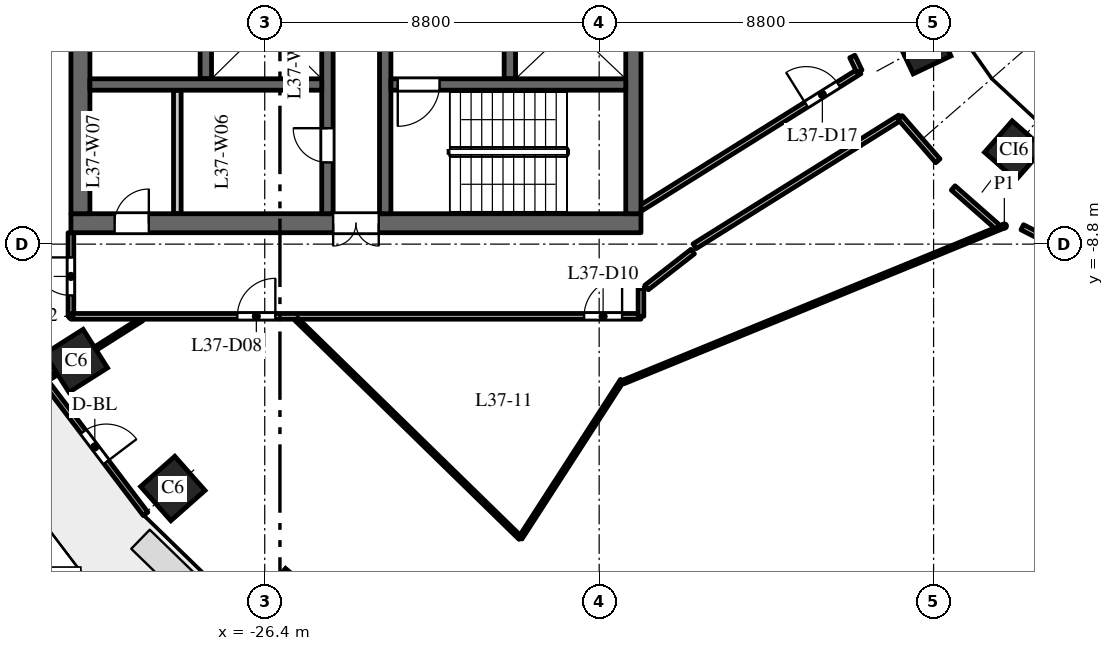
"""IFC4 building model, lengths in metres.
Left out: names, types, materials, properties, quantities, classifications, styles, units other than length and angle.
Written with IfcOpenShell. Run it as: python <this file> out.ifc"""

import sys

from ifc_helpers import new_model, si_unit, direction, frame, frame_2d, origin, origin_2d, place, context, subcontext, project, spatial, rectangle, extrude, element, fill, save


model = new_model("IFC4")
c1 = context("Model", 3, precision=1e-05, world=origin(), true_north=direction((0.0, 1.0)))
c2 = subcontext(c1, "Body", "Model", "MODEL_VIEW")
j1 = project(units=[si_unit("LENGTHUNIT", "METRE"), si_unit("PLANEANGLEUNIT", "RADIAN")], contexts=[c1])
p1 = place(None, origin())
s1 = spatial("IfcSite", under=j1, at=p1, CompositionType="ELEMENT")
p2 = place(p1, origin())
s2 = spatial("IfcBuilding", under=s1, at=p2, CompositionType="ELEMENT")
p3 = place(p2, frame((0.0, 0.0, 162.0)))
s3 = spatial("IfcBuildingStorey", under=s2, at=p3, CompositionType="ELEMENT", Elevation=162.0)
for number, where, z_axis, x_axis in (
    (1, (-31.365, -11.871, 0.0), (0.0, 0.0, 1.0), (0.535, -0.845, 0.0)),
    (2, (-28.819, -15.23, 0.0), (0.0, 0.0, 1.0), (0.663, -0.749, 0.0)),
    (3, (-25.783, -18.18, 0.0), (0.0, 0.0, 1.0), (0.763, -0.646, 0.0)),
):
    element("IfcColumn", number, at=place(p3, frame(where, z_axis=z_axis, x_axis=x_axis)), inside=s3, PredefinedType="COLUMN", context=c2, shape_type="SweptSolid", body=[
        extrude(rectangle(XDim=1.2, YDim=1.2, at=origin_2d()), origin(), (0.0, 0.0, 1.0), 4.0),
    ])
for number, where, z_axis, x_axis in (
    (4, (-9.076, -3.588, 0.0), (0.0, 0.0, 1.0), (0.429, -0.903, 0.0)),
    (5, (-6.682, -6.334, 0.0), (0.0, 0.0, 1.0), (0.751, -0.66, 0.0)),
):
    element("IfcColumn", number, at=place(p3, frame(where, z_axis=z_axis, x_axis=x_axis)), inside=s3, PredefinedType="COLUMN", context=c2, shape_type="SweptSolid", body=[
        extrude(rectangle(XDim=1.1, YDim=1.1, at=origin_2d()), origin(), (0.0, 0.0, 1.0), 4.0),
    ])
p4 = place(p3, frame((-16.5, -8.25, 0.0), z_axis=(0.0, 0.0, 1.0), x_axis=(-1.0, 0.0, 0.0)))
e6 = element("IfcWall", 6, at=p4, inside=s3, PredefinedType="SHEAR", context=c2, shape_type="SweptSolid", body=[
    extrude(rectangle(XDim=15.0, YDim=0.5, at=frame_2d((7.5, 0.0))), origin(), (0.0, 0.0, 1.0), 3.7),
])
p5 = place(p4, frame((6.9, 0.0, 0.0)))
e7 = element("IfcOpeningElement", 7, at=p5, cuts=e6, PredefinedType="OPENING", context=c2, shape_type="SweptSolid", body=[
    extrude(rectangle(XDim=1.2, YDim=2.1, at=frame_2d((0.6, 1.05))), frame((0.0, 0.26, 0.0), z_axis=(0.0, -1.0, 0.0), x_axis=(1.0, 0.0, 0.0)), (0.0, 0.0, 1.0), 0.52),
])
p6 = place(p4, frame((12.95, 0.0, 0.0)))
e8 = element("IfcOpeningElement", 8, at=p6, cuts=e6, PredefinedType="OPENING", context=c2, shape_type="SweptSolid", body=[
    extrude(rectangle(XDim=0.9, YDim=2.1, at=frame_2d((0.45, 1.05))), frame((0.0, 0.26, 0.0), z_axis=(0.0, -1.0, 0.0), x_axis=(1.0, 0.0, 0.0)), (0.0, 0.0, 1.0), 0.52),
])
p7 = place(p3, frame((-27.95, -4.45, 0.0), z_axis=(0.0, 0.0, 1.0), x_axis=(0.0, 1.0, 0.0)))
e9 = element("IfcWall", 9, at=p7, inside=s3, PredefinedType="SHEAR", context=c2, shape_type="SweptSolid", body=[
    extrude(rectangle(XDim=8.9, YDim=0.3, at=frame_2d((4.45, 0.0))), origin(), (0.0, 0.0, 1.0), 3.7),
])
p8 = place(p3, frame((-19.95, -4.45, 0.0), z_axis=(0.0, 0.0, 1.0), x_axis=(0.0, 1.0, 0.0)))
e10 = element("IfcWall", 10, at=p8, inside=s3, PredefinedType="SHEAR", context=c2, shape_type="SweptSolid", body=[
    extrude(rectangle(XDim=8.9, YDim=0.3, at=frame_2d((4.45, 0.0))), origin(), (0.0, 0.0, 1.0), 3.7),
])
p9 = place(p8, frame((0.775, 0.0, 0.0)))
e11 = element("IfcOpeningElement", 11, at=p9, cuts=e10, PredefinedType="OPENING", context=c2, shape_type="SweptSolid", body=[
    extrude(rectangle(XDim=1.2, YDim=2.1, at=frame_2d((0.6, 1.05))), frame((0.0, 0.16, 0.0), z_axis=(0.0, -1.0, 0.0), x_axis=(1.0, 0.0, 0.0)), (0.0, 0.0, 1.0), 0.32),
])
p10 = place(p8, frame((7.25, 0.0, 0.0)))
e12 = element("IfcOpeningElement", 12, at=p10, cuts=e10, PredefinedType="OPENING", context=c2, shape_type="SweptSolid", body=[
    extrude(rectangle(XDim=1.1, YDim=2.1, at=frame_2d((0.55, 1.05))), frame((0.0, 0.16, 0.0), z_axis=(0.0, -1.0, 0.0), x_axis=(1.0, 0.0, 0.0)), (0.0, 0.0, 1.0), 0.32),
])
p11 = place(p3, frame((-24.75, -8.0, 0.0), z_axis=(0.0, 0.0, 1.0), x_axis=(0.0, 1.0, 0.0)))
e13 = element("IfcWall", 13, at=p11, inside=s3, PredefinedType="SHEAR", context=c2, shape_type="SweptSolid", body=[
    extrude(rectangle(XDim=16.0, YDim=0.3, at=frame_2d((8.0, 0.0))), origin(), (0.0, 0.0, 1.0), 3.7),
])
p12 = place(p11, frame((4.425, 0.0, 0.0)))
e14 = element("IfcOpeningElement", 14, at=p12, cuts=e13, PredefinedType="OPENING", context=c2, shape_type="SweptSolid", body=[
    extrude(rectangle(XDim=1.1, YDim=2.1, at=frame_2d((0.55, 1.05))), frame((0.0, 0.16, 0.0), z_axis=(0.0, -1.0, 0.0), x_axis=(1.0, 0.0, 0.0)), (0.0, 0.0, 1.0), 0.32),
])
p13 = place(p11, frame((7.45, 0.0, 0.0)))
e15 = element("IfcOpeningElement", 15, at=p13, cuts=e13, PredefinedType="OPENING", context=c2, shape_type="SweptSolid", body=[
    extrude(rectangle(XDim=1.1, YDim=2.1, at=frame_2d((0.55, 1.05))), frame((0.0, 0.16, 0.0), z_axis=(0.0, -1.0, 0.0), x_axis=(1.0, 0.0, 0.0)), (0.0, 0.0, 1.0), 0.32),
])
p14 = place(p11, frame((10.475, 0.0, 0.0)))
e16 = element("IfcOpeningElement", 16, at=p14, cuts=e13, PredefinedType="OPENING", context=c2, shape_type="SweptSolid", body=[
    extrude(rectangle(XDim=1.1, YDim=2.1, at=frame_2d((0.55, 1.05))), frame((0.0, 0.16, 0.0), z_axis=(0.0, -1.0, 0.0), x_axis=(1.0, 0.0, 0.0)), (0.0, 0.0, 1.0), 0.32),
])
p15 = place(p11, frame((13.75, 0.0, 0.0)))
e17 = element("IfcOpeningElement", 17, at=p15, cuts=e13, PredefinedType="OPENING", context=c2, shape_type="SweptSolid", body=[
    extrude(rectangle(XDim=0.9, YDim=2.1, at=frame_2d((0.45, 1.05))), frame((0.0, 0.16, 0.0), z_axis=(0.0, -1.0, 0.0), x_axis=(1.0, 0.0, 0.0)), (0.0, 0.0, 1.0), 0.32),
])
p16 = place(p11, frame((1.35, 0.0, 0.0)))
e18 = element("IfcOpeningElement", 18, at=p16, cuts=e13, PredefinedType="OPENING", context=c2, shape_type="SweptSolid", body=[
    extrude(rectangle(XDim=0.9, YDim=2.1, at=frame_2d((0.45, 1.05))), frame((0.0, 0.16, 0.0), z_axis=(0.0, -1.0, 0.0), x_axis=(1.0, 0.0, 0.0)), (0.0, 0.0, 1.0), 0.32),
])
p17 = place(p3, frame((-16.7, -8.0, 0.0), z_axis=(0.0, 0.0, 1.0), x_axis=(0.0, 1.0, 0.0)))
e19 = element("IfcWall", 19, at=p17, inside=s3, PredefinedType="SHEAR", context=c2, shape_type="SweptSolid", body=[
    extrude(rectangle(XDim=16.0, YDim=0.4, at=frame_2d((8.0, 0.0))), origin(), (0.0, 0.0, 1.0), 3.7),
])
p18 = place(p3, frame((-31.25, -8.0, 0.0), z_axis=(0.0, 0.0, 1.0), x_axis=(0.0, 1.0, 0.0)))
e20 = element("IfcWall", 20, at=p18, inside=s3, PredefinedType="SHEAR", context=c2, shape_type="SweptSolid", body=[
    extrude(rectangle(XDim=16.0, YDim=0.5, at=frame_2d((8.0, 0.0))), origin(), (0.0, 0.0, 1.0), 3.7),
])
p19 = place(p3, frame((-28.7, -8.0, 0.0), z_axis=(0.0, 0.0, 1.0), x_axis=(0.0, 1.0, 0.0)))
e21 = element("IfcWall", 21, at=p19, inside=s3, PredefinedType="PARTITIONING", context=c2, shape_type="SweptSolid", body=[
    extrude(rectangle(XDim=3.25, YDim=0.2, at=frame_2d((1.625, 0.0))), origin(), (0.0, 0.0, 1.0), 3.7),
])
p20 = place(p3, frame((-24.9, -4.6, 0.0), z_axis=(0.0, 0.0, 1.0), x_axis=(-1.0, 0.0, 0.0)))
e22 = element("IfcWall", 22, at=p20, inside=s3, PredefinedType="SHEAR", context=c2, shape_type="SweptSolid", body=[
    extrude(rectangle(XDim=6.1, YDim=0.3, at=frame_2d((3.05, 0.0))), origin(), (0.0, 0.0, 1.0), 3.7),
])
p21 = place(p3, frame((-23.23, -8.0, 0.0), z_axis=(0.0, 0.0, 1.0), x_axis=(0.0, 1.0, 0.0)))
e23 = element("IfcWall", 23, at=p21, inside=s3, PredefinedType="SHEAR", context=c2, shape_type="SweptSolid", body=[
    extrude(rectangle(XDim=7.875, YDim=0.3, at=frame_2d((3.938, 0.0))), origin(), (0.0, 0.0, 1.0), 3.7),
])
p22 = place(p21, frame((5.15, 0.0, 0.0)))
e24 = element("IfcOpeningElement", 24, at=p22, cuts=e23, PredefinedType="OPENING", context=c2, shape_type="SweptSolid", body=[
    extrude(rectangle(XDim=1.1, YDim=2.1, at=frame_2d((0.55, 1.05))), frame((0.0, 0.16, 0.0), z_axis=(0.0, -1.0, 0.0), x_axis=(1.0, 0.0, 0.0)), (0.0, 0.0, 1.0), 0.32),
])
p23 = place(p3, frame((-16.9, -4.6, 0.0), z_axis=(0.0, 0.0, 1.0), x_axis=(-1.0, 0.0, 0.0)))
e25 = element("IfcWall", 25, at=p23, inside=s3, PredefinedType="SHEAR", context=c2, shape_type="SweptSolid", body=[
    extrude(rectangle(XDim=6.18, YDim=0.3, at=frame_2d((3.09, 0.0))), origin(), (0.0, 0.0, 1.0), 3.7),
])
p24 = place(p23, frame((4.9, 0.0, 0.0)))
e26 = element("IfcOpeningElement", 26, at=p24, cuts=e25, PredefinedType="OPENING", context=c2, shape_type="SweptSolid", body=[
    extrude(rectangle(XDim=1.1, YDim=2.1, at=frame_2d((0.55, 1.05))), frame((0.0, 0.16, 0.0), z_axis=(0.0, -1.0, 0.0), x_axis=(1.0, 0.0, 0.0)), (0.0, 0.0, 1.0), 0.32),
])
p25 = place(p3, frame((-32.208, -12.374, 0.0), z_axis=(0.0, 0.0, 1.0), x_axis=(0.604045763106, -0.796949632081, 0.0)))
e27 = element("IfcWall", 27, at=p25, inside=s3, PredefinedType="STANDARD", context=c2, shape_type="SweptSolid", body=[
    extrude(rectangle(XDim=4.423, YDim=0.15, at=frame_2d((2.212, 0.0))), origin(), (0.0, 0.0, 1.0), 3.7),
])
p26 = place(p25, frame((1.712, 0.0, 0.0)))
e28 = element("IfcOpeningElement", 28, at=p26, cuts=e27, PredefinedType="OPENING", context=c2, shape_type="SweptSolid", body=[
    extrude(rectangle(XDim=1.0, YDim=2.4, at=frame_2d((0.5, 1.2))), frame((0.0, 0.085, 0.0), z_axis=(0.0, -1.0, 0.0), x_axis=(1.0, 0.0, 0.0)), (0.0, 0.0, 1.0), 0.17),
])
p27 = place(p3, frame((-32.212, -12.408, 0.0), z_axis=(0.0, 0.0, 1.0), x_axis=(0.844810627195, 0.535065420467, 0.0)))
e29 = element("IfcWall", 29, at=p27, inside=s3, PredefinedType="PARTITIONING", context=c2, shape_type="SweptSolid", body=[
    extrude(rectangle(XDim=3.048, YDim=0.1, at=frame_2d((1.524, 0.0))), origin(), (0.0, 0.0, 1.0), 3.7),
])
p28 = place(p3, frame((-31.5, -10.7, 0.0), z_axis=(0.0, 0.0, 1.0), x_axis=(0.0, 1.0, 0.0)))
e30 = element("IfcWall", 30, at=p28, inside=s3, PredefinedType="PARTITIONING", context=c2, shape_type="SweptSolid", body=[
    extrude(rectangle(XDim=2.2, YDim=0.15, at=frame_2d((1.1, 0.0))), origin(), (0.0, 0.0, 1.0), 3.7),
])
p29 = place(p28, frame((0.55, 0.0, 0.0)))
e31 = element("IfcOpeningElement", 31, at=p29, cuts=e30, PredefinedType="OPENING", context=c2, shape_type="SweptSolid", body=[
    extrude(rectangle(XDim=1.0, YDim=2.1, at=frame_2d((0.5, 1.05))), frame((0.0, 0.085, 0.0), z_axis=(0.0, -1.0, 0.0), x_axis=(1.0, 0.0, 0.0)), (0.0, 0.0, 1.0), 0.17),
])
p30 = place(p3, frame((-31.5, -10.7, 0.0), z_axis=(0.0, 0.0, 1.0), x_axis=(1.0, 0.0, 0.0)))
e32 = element("IfcWall", 32, at=p30, inside=s3, PredefinedType="PARTITIONING", context=c2, shape_type="SweptSolid", body=[
    extrude(rectangle(XDim=15.0, YDim=0.15, at=frame_2d((7.5, 0.0))), origin(), (0.0, 0.0, 1.0), 3.1),
])
p31 = place(p30, frame((4.379, 0.0, 0.0)))
e33 = element("IfcOpeningElement", 33, at=p31, cuts=e32, PredefinedType="OPENING", context=c2, shape_type="SweptSolid", body=[
    extrude(rectangle(XDim=1.0, YDim=2.1, at=frame_2d((0.5, 1.05))), frame((0.0, 0.085, 0.0), z_axis=(0.0, -1.0, 0.0), x_axis=(1.0, 0.0, 0.0)), (0.0, 0.0, 1.0), 0.17),
])
p32 = place(p30, frame((13.504, 0.0, 0.0)))
e34 = element("IfcOpeningElement", 34, at=p32, cuts=e32, PredefinedType="OPENING", context=c2, shape_type="SweptSolid", body=[
    extrude(rectangle(XDim=1.0, YDim=2.1, at=frame_2d((0.5, 1.05))), frame((0.0, 0.085, 0.0), z_axis=(0.0, -1.0, 0.0), x_axis=(1.0, 0.0, 0.0)), (0.0, 0.0, 1.0), 0.17),
])
p33 = place(p3, frame((-25.566, -10.778, 0.0), z_axis=(0.0, 0.0, 1.0), x_axis=(0.715430617602, -0.698683784982, 0.0)))
e35 = element("IfcWall", 35, at=p33, inside=s3, PredefinedType="PARTITIONING", context=c2, shape_type="SweptSolid", body=[
    extrude(rectangle(XDim=8.237, YDim=0.1, at=frame_2d((4.118, 0.0))), origin(), (0.0, 0.0, 1.0), 2.75),
])
p34 = place(p3, frame((-19.673, -16.533, 0.0), z_axis=(0.0, 0.0, 1.0), x_axis=(0.542297022656, 0.840186847801, 0.0)))
e36 = element("IfcWall", 36, at=p34, inside=s3, PredefinedType="PARTITIONING", context=c2, shape_type="SweptSolid", body=[
    extrude(rectangle(XDim=4.935, YDim=0.1, at=frame_2d((2.467, 0.0))), origin(), (0.0, 0.0, 1.0), 3.7),
])
p35 = place(p3, frame((-16.963, -12.427, 0.0), z_axis=(0.0, 0.0, 1.0), x_axis=(0.925484473487, 0.378785545308, 0.0)))
e37 = element("IfcWall", 37, at=p35, inside=s3, PredefinedType="PARTITIONING", context=c2, shape_type="SweptSolid", body=[
    extrude(rectangle(XDim=10.832, YDim=0.1, at=frame_2d((5.416, 0.0))), origin(), (0.0, 0.0, 1.0), 3.7),
])
p36 = place(p3, frame((-16.5, -10.7, 0.0), z_axis=(0.0, 0.0, 1.0), x_axis=(0.0, 1.0, 0.0)))
e38 = element("IfcWall", 38, at=p36, inside=s3, PredefinedType="PARTITIONING", context=c2, shape_type="SweptSolid", body=[
    extrude(rectangle(XDim=0.736, YDim=0.15, at=frame_2d((0.368, 0.0))), origin(), (0.0, 0.0, 1.0), 3.7),
])
p37 = place(p3, frame((-16.5, -7.851, 0.0), z_axis=(0.0, 0.0, 1.0), x_axis=(0.847690706888, 0.530490777917, 0.0)))
e39 = element("IfcWall", 39, at=p37, inside=s3, PredefinedType="PARTITIONING", context=c2, shape_type="SweptSolid", body=[
    extrude(rectangle(XDim=6.781, YDim=0.15, at=frame_2d((3.39, 0.0))), origin(), (0.0, 0.0, 1.0), 3.7),
])
p38 = place(p37, frame((5.131, 0.0, 0.0)))
e40 = element("IfcOpeningElement", 40, at=p38, cuts=e39, PredefinedType="OPENING", context=c2, shape_type="SweptSolid", body=[
    extrude(rectangle(XDim=1.0, YDim=2.1, at=frame_2d((0.5, 1.05))), frame((0.0, 0.085, 0.0), z_axis=(0.0, -1.0, 0.0), x_axis=(1.0, 0.0, 0.0)), (0.0, 0.0, 1.0), 0.17),
])
p39 = place(p3, frame((-15.089, -8.856, 0.0), z_axis=(0.0, 0.0, 1.0), x_axis=(0.847602682855, 0.530631408811, 0.0)))
e41 = element("IfcWall", 41, at=p39, inside=s3, PredefinedType="PARTITIONING", context=c2, shape_type="SweptSolid", body=[
    extrude(rectangle(XDim=6.383, YDim=0.15, at=frame_2d((3.191, 0.0))), origin(), (0.0, 0.0, 1.0), 3.7),
])
p40 = place(p3, frame((-10.938, -3.863, 0.0), z_axis=(0.0, 0.0, 1.0), x_axis=(0.429758433873, -0.90294390109, 0.0)))
e42 = element("IfcWall", 42, at=p40, inside=s3, PredefinedType="PARTITIONING", context=c2, shape_type="SweptSolid", body=[
    extrude(rectangle(XDim=0.433, YDim=0.15, at=frame_2d((0.216, 0.0))), origin(), (0.0, 0.0, 1.0), 3.7),
])
p41 = place(p3, frame((-9.679, -5.469, 0.0), z_axis=(0.0, 0.0, 1.0), x_axis=(0.656454677423, -0.75436546613, 0.0)))
e43 = element("IfcWall", 43, at=p41, inside=s3, PredefinedType="PARTITIONING", context=c2, shape_type="SweptSolid", body=[
    extrude(rectangle(XDim=1.511, YDim=0.15, at=frame_2d((0.755, 0.0))), origin(), (0.0, 0.0, 1.0), 2.75),
])
p42 = place(p3, frame((-8.284, -7.322, 0.0), z_axis=(0.0, 0.0, 1.0), x_axis=(0.750666784408, -0.660680996235, 0.0)))
e44 = element("IfcWall", 44, at=p42, inside=s3, PredefinedType="PARTITIONING", context=c2, shape_type="SweptSolid", body=[
    extrude(rectangle(XDim=1.555, YDim=0.15, at=frame_2d((0.777, 0.0))), origin(), (0.0, 0.0, 1.0), 3.7),
])
p43 = place(p3, frame((-6.466, -8.356, 0.0), z_axis=(0.0, 0.0, 1.0), x_axis=(0.889472002788, -0.456989667559, 0.0)))
e45 = element("IfcWall", 45, at=p43, inside=s3, PredefinedType="PARTITIONING", context=c2, shape_type="SweptSolid", body=[
    extrude(rectangle(XDim=1.355, YDim=0.15, at=frame_2d((0.677, 0.0))), origin(), (0.0, 0.0, 1.0), 3.7),
])
p44 = place(p3, frame((-15.139, -8.997, 0.0), z_axis=(0.0, 0.0, 1.0), x_axis=(-0.788950226826, -0.614457109643, 0.0)))
e46 = element("IfcWall", 46, at=p44, inside=s3, PredefinedType="PARTITIONING", context=c2, shape_type="SweptSolid", body=[
    extrude(rectangle(XDim=1.538, YDim=0.15, at=frame_2d((0.769, 0.0))), origin(), (0.0, 0.0, 1.0), 3.7),
])
p45 = place(p24, origin())
e47 = element("IfcDoor", 47, at=p45, inside=s3, OperationType="SINGLE_SWING_LEFT", PredefinedType="DOOR", context=c2, shape_type="SweptSolid", body=[
    extrude(rectangle(XDim=1.1, YDim=2.1, at=frame_2d((0.55, 1.05))), frame((0.0, 0.025, 0.0), z_axis=(0.0, -1.0, 0.0), x_axis=(1.0, 0.0, 0.0)), (0.0, 0.0, 1.0), 0.05),
])
fill(e26, e47)
p46 = place(p5, origin())
e48 = element("IfcDoor", 48, at=p46, inside=s3, OperationType="DOUBLE_DOOR_DOUBLE_SWING", PredefinedType="DOOR", context=c2, shape_type="SweptSolid", body=[
    extrude(rectangle(XDim=1.2, YDim=2.1, at=frame_2d((0.6, 1.05))), frame((0.0, 0.025, 0.0), z_axis=(0.0, -1.0, 0.0), x_axis=(1.0, 0.0, 0.0)), (0.0, 0.0, 1.0), 0.05),
])
fill(e7, e48)
p47 = place(p16, origin())
e49 = element("IfcDoor", 49, at=p47, inside=s3, OperationType="SINGLE_SWING_LEFT", PredefinedType="DOOR", context=c2, shape_type="SweptSolid", body=[
    extrude(rectangle(XDim=0.9, YDim=2.1, at=frame_2d((0.45, 1.05))), frame((0.0, 0.025, 0.0), z_axis=(0.0, -1.0, 0.0), x_axis=(1.0, 0.0, 0.0)), (0.0, 0.0, 1.0), 0.05),
])
fill(e18, e49)
p48 = place(p6, origin())
e50 = element("IfcDoor", 50, at=p48, inside=s3, OperationType="SINGLE_SWING_LEFT", PredefinedType="DOOR", context=c2, shape_type="SweptSolid", body=[
    extrude(rectangle(XDim=0.9, YDim=2.1, at=frame_2d((0.45, 1.05))), frame((0.0, 0.025, 0.0), z_axis=(0.0, -1.0, 0.0), x_axis=(1.0, 0.0, 0.0)), (0.0, 0.0, 1.0), 0.05),
])
fill(e8, e50)
p49 = place(p26, origin())
e51 = element("IfcDoor", 51, at=p49, inside=s3, OperationType="SINGLE_SWING_RIGHT", PredefinedType="DOOR", context=c2, shape_type="SweptSolid", body=[
    extrude(rectangle(XDim=1.0, YDim=2.4, at=frame_2d((0.5, 1.2))), frame((0.0, 0.025, 0.0), z_axis=(0.0, -1.0, 0.0), x_axis=(1.0, 0.0, 0.0)), (0.0, 0.0, 1.0), 0.05),
])
fill(e28, e51)
p50 = place(p29, origin())
e52 = element("IfcDoor", 52, at=p50, inside=s3, OperationType="SINGLE_SWING_RIGHT", PredefinedType="DOOR", context=c2, shape_type="SweptSolid", body=[
    extrude(rectangle(XDim=1.0, YDim=2.1, at=frame_2d((0.5, 1.05))), frame((0.0, 0.025, 0.0), z_axis=(0.0, -1.0, 0.0), x_axis=(1.0, 0.0, 0.0)), (0.0, 0.0, 1.0), 0.05),
])
fill(e31, e52)
p51 = place(p31, origin())
e53 = element("IfcDoor", 53, at=p51, inside=s3, OperationType="SINGLE_SWING_RIGHT", PredefinedType="DOOR", context=c2, shape_type="SweptSolid", body=[
    extrude(rectangle(XDim=1.0, YDim=2.1, at=frame_2d((0.5, 1.05))), frame((0.0, 0.025, 0.0), z_axis=(0.0, -1.0, 0.0), x_axis=(1.0, 0.0, 0.0)), (0.0, 0.0, 1.0), 0.05),
])
fill(e33, e53)
p52 = place(p32, origin())
e54 = element("IfcDoor", 54, at=p52, inside=s3, OperationType="SINGLE_SWING_RIGHT", PredefinedType="DOOR", context=c2, shape_type="SweptSolid", body=[
    extrude(rectangle(XDim=1.0, YDim=2.1, at=frame_2d((0.5, 1.05))), frame((0.0, 0.025, 0.0), z_axis=(0.0, -1.0, 0.0), x_axis=(1.0, 0.0, 0.0)), (0.0, 0.0, 1.0), 0.05),
])
fill(e34, e54)
p53 = place(p38, origin())
e55 = element("IfcDoor", 55, at=p53, inside=s3, OperationType="SINGLE_SWING_LEFT", PredefinedType="DOOR", context=c2, shape_type="SweptSolid", body=[
    extrude(rectangle(XDim=1.0, YDim=2.1, at=frame_2d((0.5, 1.05))), frame((0.0, 0.025, 0.0), z_axis=(0.0, -1.0, 0.0), x_axis=(1.0, 0.0, 0.0)), (0.0, 0.0, 1.0), 0.05),
])
fill(e40, e55)
save(model, sys.argv[1])
